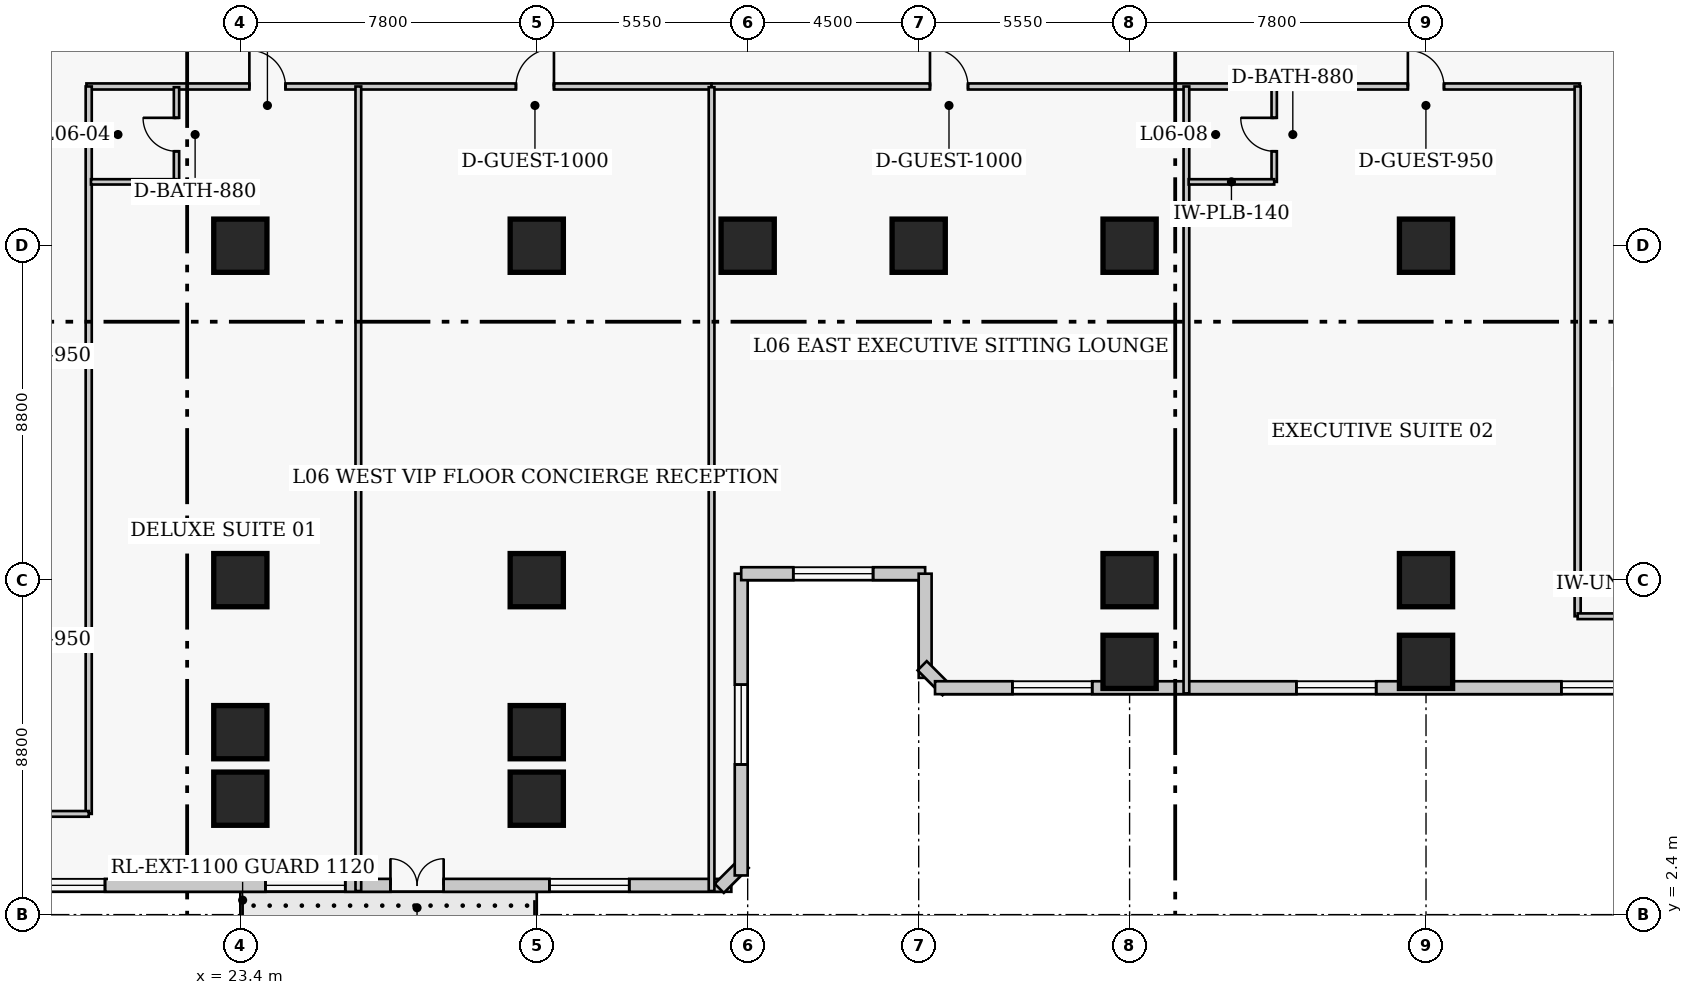
"""IFC4 building model, lengths in metres.
Left out: names, types, materials, properties, quantities, classifications, styles, units other than length and angle.
Written with IfcOpenShell. Run it as: python <this file> out.ifc"""

import sys

from ifc_helpers import new_model, si_unit, direction, frame, frame_2d, origin, origin_2d, place, context, subcontext, project, spatial, rectangle, extrude, element, fill, save


model = new_model("IFC4")
c1 = context("Model", 3, precision=1e-05, world=origin(), true_north=direction((0.0, 1.0)))
c2 = subcontext(c1, "Body", "Model", "MODEL_VIEW")
j1 = project(units=[si_unit("LENGTHUNIT", "METRE"), si_unit("PLANEANGLEUNIT", "RADIAN")], contexts=[c1])
p1 = place(None, origin())
s1 = spatial("IfcSite", under=j1, at=p1, CompositionType="ELEMENT")
p2 = place(p1, origin())
s2 = spatial("IfcBuilding", under=s1, at=p2, CompositionType="ELEMENT")
p3 = place(p2, frame((0.0, 0.0, 29.8)))
s3 = spatial("IfcBuildingStorey", under=s2, at=p3, CompositionType="ELEMENT", Elevation=29.8)
for number, where, z_axis, x_axis in (
    (1, (23.4, 11.2, 0.0), (0.0, 0.0, 1.0), (1.0, 0.0, 0.0)),
    (2, (23.4, 20.0, 0.0), (0.0, 0.0, 1.0), (1.0, 0.0, 0.0)),
    (3, (31.2, 11.2, 0.0), (0.0, 0.0, 1.0), (1.0, 0.0, 0.0)),
    (4, (31.2, 20.0, 0.0), (0.0, 0.0, 1.0), (1.0, 0.0, 0.0)),
    (5, (36.75, 20.0, 0.0), (0.0, 0.0, 1.0), (1.0, 0.0, 0.0)),
    (6, (41.25, 20.0, 0.0), (0.0, 0.0, 1.0), (1.0, 0.0, 0.0)),
    (7, (46.8, 11.2, 0.0), (0.0, 0.0, 1.0), (1.0, 0.0, 0.0)),
    (8, (46.8, 20.0, 0.0), (0.0, 0.0, 1.0), (1.0, 0.0, 0.0)),
    (9, (54.6, 11.2, 0.0), (0.0, 0.0, 1.0), (1.0, 0.0, 0.0)),
    (10, (54.6, 20.0, 0.0), (0.0, 0.0, 1.0), (1.0, 0.0, 0.0)),
    (11, (23.4, 7.2, 0.0), (0.0, 0.0, 1.0), (1.0, 0.0, 0.0)),
    (12, (31.2, 7.2, 0.0), (0.0, 0.0, 1.0), (1.0, 0.0, 0.0)),
    (13, (23.4, 5.45, 0.0), (0.0, 0.0, 1.0), (1.0, 0.0, 0.0)),
    (14, (31.2, 5.45, 0.0), (0.0, 0.0, 1.0), (1.0, 0.0, 0.0)),
    (15, (46.8, 9.05, 0.0), (0.0, 0.0, 1.0), (1.0, 0.0, 0.0)),
    (16, (54.6, 9.05, 0.0), (0.0, 0.0, 1.0), (1.0, 0.0, 0.0)),
):
    element("IfcColumn", number, at=place(p3, frame(where, z_axis=z_axis, x_axis=x_axis)), inside=s3, PredefinedType="COLUMN", context=c2, shape_type="SweptSolid", body=[
        extrude(rectangle(XDim=1.4, YDim=1.4, at=origin_2d()), origin(), (0.0, 0.0, 1.0), 3.8),
    ])
p4 = place(p3, frame((6.43, 3.17, 0.0), z_axis=(0.0, 0.0, 1.0), x_axis=(1.0, 0.0, 0.0)))
e17 = element("IfcWall", 17, at=p4, inside=s3, PredefinedType="SOLIDWALL", context=c2, shape_type="SweptSolid", body=[
    extrude(rectangle(XDim=29.89, YDim=0.34, at=frame_2d((14.945, 0.0))), origin(), (0.0, 0.0, 1.0), 3.54),
])
p5 = place(p4, frame((20.92, 0.0, 0.0)))
e18 = element("IfcOpeningElement", 18, at=p5, cuts=e17, PredefinedType="OPENING", context=c2, shape_type="SweptSolid", body=[
    extrude(rectangle(XDim=1.4, YDim=2.15, at=frame_2d((0.7, 1.075))), frame((0.0, 0.18, 0.0), z_axis=(0.0, -1.0, 0.0), x_axis=(1.0, 0.0, 0.0)), (0.0, 0.0, 1.0), 0.36),
])
p6 = place(p4, frame((2.686, 0.0, 0.85)))
e19 = element("IfcOpeningElement", 19, at=p6, cuts=e17, PredefinedType="OPENING", context=c2, shape_type="SweptSolid", body=[
    extrude(rectangle(XDim=2.1, YDim=1.85, at=frame_2d((1.05, 0.925))), frame((0.0, 0.18, 0.0), z_axis=(0.0, -1.0, 0.0), x_axis=(1.0, 0.0, 0.0)), (0.0, 0.0, 1.0), 0.36),
])
p7 = place(p4, frame((11.309, 0.0, 0.85)))
e20 = element("IfcOpeningElement", 20, at=p7, cuts=e17, PredefinedType="OPENING", context=c2, shape_type="SweptSolid", body=[
    extrude(rectangle(XDim=2.1, YDim=1.85, at=frame_2d((1.05, 0.925))), frame((0.0, 0.18, 0.0), z_axis=(0.0, -1.0, 0.0), x_axis=(1.0, 0.0, 0.0)), (0.0, 0.0, 1.0), 0.36),
])
p8 = place(p4, frame((17.631, 0.0, 0.85)))
e21 = element("IfcOpeningElement", 21, at=p8, cuts=e17, PredefinedType="OPENING", context=c2, shape_type="SweptSolid", body=[
    extrude(rectangle(XDim=2.1, YDim=1.85, at=frame_2d((1.05, 0.925))), frame((0.0, 0.18, 0.0), z_axis=(0.0, -1.0, 0.0), x_axis=(1.0, 0.0, 0.0)), (0.0, 0.0, 1.0), 0.36),
])
p9 = place(p4, frame((25.104, 0.0, 0.85)))
e22 = element("IfcOpeningElement", 22, at=p9, cuts=e17, PredefinedType="OPENING", context=c2, shape_type="SweptSolid", body=[
    extrude(rectangle(XDim=2.1, YDim=1.85, at=frame_2d((1.05, 0.925))), frame((0.0, 0.18, 0.0), z_axis=(0.0, -1.0, 0.0), x_axis=(1.0, 0.0, 0.0)), (0.0, 0.0, 1.0), 0.36),
])
p10 = place(p3, frame((36.001, 3.092, 0.0), z_axis=(0.0, 0.0, 1.0), x_axis=(0.707106781187, 0.707106781187, 0.0)))
e23 = element("IfcWall", 23, at=p10, inside=s3, PredefinedType="SOLIDWALL", context=c2, shape_type="SweptSolid", body=[
    extrude(rectangle(XDim=0.929, YDim=0.34, at=frame_2d((0.464, 0.0))), origin(), (0.0, 0.0, 1.0), 3.54),
])
p11 = place(p3, frame((36.58, 3.43, 0.0), z_axis=(0.0, 0.0, 1.0), x_axis=(0.0, 1.0, 0.0)))
e24 = element("IfcWall", 24, at=p11, inside=s3, PredefinedType="SOLIDWALL", context=c2, shape_type="SweptSolid", body=[
    extrude(rectangle(XDim=7.94, YDim=0.34, at=frame_2d((3.97, 0.0))), origin(), (0.0, 0.0, 1.0), 3.54),
])
p12 = place(p11, frame((2.92, 0.0, 0.85)))
e25 = element("IfcOpeningElement", 25, at=p12, cuts=e24, PredefinedType="OPENING", context=c2, shape_type="SweptSolid", body=[
    extrude(rectangle(XDim=2.1, YDim=1.85, at=frame_2d((1.05, 0.925))), frame((0.0, 0.18, 0.0), z_axis=(0.0, -1.0, 0.0), x_axis=(1.0, 0.0, 0.0)), (0.0, 0.0, 1.0), 0.36),
])
p13 = place(p3, frame((36.58, 11.37, 0.0), z_axis=(0.0, 0.0, 1.0), x_axis=(1.0, 0.0, 0.0)))
e26 = element("IfcWall", 26, at=p13, inside=s3, PredefinedType="SOLIDWALL", context=c2, shape_type="SweptSolid", body=[
    extrude(rectangle(XDim=4.84, YDim=0.34, at=frame_2d((2.42, 0.0))), origin(), (0.0, 0.0, 1.0), 3.54),
])
p14 = place(p13, frame((1.37, 0.0, 0.85)))
e27 = element("IfcOpeningElement", 27, at=p14, cuts=e26, PredefinedType="OPENING", context=c2, shape_type="SweptSolid", body=[
    extrude(rectangle(XDim=2.1, YDim=1.85, at=frame_2d((1.05, 0.925))), frame((0.0, 0.18, 0.0), z_axis=(0.0, -1.0, 0.0), x_axis=(1.0, 0.0, 0.0)), (0.0, 0.0, 1.0), 0.36),
])
p15 = place(p3, frame((41.42, 11.37, 0.0), z_axis=(0.0, 0.0, 1.0), x_axis=(0.0, -1.0, 0.0)))
e28 = element("IfcWall", 28, at=p15, inside=s3, PredefinedType="SOLIDWALL", context=c2, shape_type="SweptSolid", body=[
    extrude(rectangle(XDim=2.74, YDim=0.34, at=frame_2d((1.37, 0.0))), origin(), (0.0, 0.0, 1.0), 3.54),
])
p16 = place(p3, frame((41.342, 8.948, 0.0), z_axis=(0.0, 0.0, 1.0), x_axis=(0.707238225886, -0.706975312048, 0.0)))
e29 = element("IfcWall", 29, at=p16, inside=s3, PredefinedType="SOLIDWALL", context=c2, shape_type="SweptSolid", body=[
    extrude(rectangle(XDim=0.929, YDim=0.34, at=frame_2d((0.464, 0.0))), origin(), (0.0, 0.0, 1.0), 3.54),
])
p17 = place(p3, frame((41.68, 8.37, 0.0), z_axis=(0.0, 0.0, 1.0), x_axis=(1.0, 0.0, 0.0)))
e30 = element("IfcWall", 30, at=p17, inside=s3, PredefinedType="SOLIDWALL", context=c2, shape_type="SweptSolid", body=[
    extrude(rectangle(XDim=29.89, YDim=0.34, at=frame_2d((14.945, 0.0))), origin(), (0.0, 0.0, 1.0), 3.54),
])
p18 = place(p17, frame((2.036, 0.0, 0.85)))
e31 = element("IfcOpeningElement", 31, at=p18, cuts=e30, PredefinedType="OPENING", context=c2, shape_type="SweptSolid", body=[
    extrude(rectangle(XDim=2.1, YDim=1.85, at=frame_2d((1.05, 0.925))), frame((0.0, 0.18, 0.0), z_axis=(0.0, -1.0, 0.0), x_axis=(1.0, 0.0, 0.0)), (0.0, 0.0, 1.0), 0.36),
])
p19 = place(p17, frame((9.509, 0.0, 0.85)))
e32 = element("IfcOpeningElement", 32, at=p19, cuts=e30, PredefinedType="OPENING", context=c2, shape_type="SweptSolid", body=[
    extrude(rectangle(XDim=2.1, YDim=1.85, at=frame_2d((1.05, 0.925))), frame((0.0, 0.18, 0.0), z_axis=(0.0, -1.0, 0.0), x_axis=(1.0, 0.0, 0.0)), (0.0, 0.0, 1.0), 0.36),
])
p20 = place(p17, frame((16.481, 0.0, 0.85)))
e33 = element("IfcOpeningElement", 33, at=p20, cuts=e30, PredefinedType="OPENING", context=c2, shape_type="SweptSolid", body=[
    extrude(rectangle(XDim=2.1, YDim=1.85, at=frame_2d((1.05, 0.925))), frame((0.0, 0.18, 0.0), z_axis=(0.0, -1.0, 0.0), x_axis=(1.0, 0.0, 0.0)), (0.0, 0.0, 1.0), 0.36),
])
p21 = place(p17, frame((26.254, 0.0, 0.85)))
e34 = element("IfcOpeningElement", 34, at=p21, cuts=e30, PredefinedType="OPENING", context=c2, shape_type="SweptSolid", body=[
    extrude(rectangle(XDim=2.1, YDim=1.85, at=frame_2d((1.05, 0.925))), frame((0.0, 0.18, 0.0), z_axis=(0.0, -1.0, 0.0), x_axis=(1.0, 0.0, 0.0)), (0.0, 0.0, 1.0), 0.36),
])
p22 = place(p3, frame((19.35, 24.19, 0.0), z_axis=(0.0, 0.0, 1.0), x_axis=(1.0, 0.0, 0.0)))
e35 = element("IfcWall", 35, at=p22, inside=s3, PredefinedType="PARTITIONING", context=c2, shape_type="SweptSolid", body=[
    extrude(rectangle(XDim=16.45, YDim=0.16, at=frame_2d((8.225, 0.0))), origin(), (0.0, 0.0, 1.0), 3.54),
])
p23 = place(p22, frame((4.288, 0.0, 0.0)))
e36 = element("IfcOpeningElement", 36, at=p23, cuts=e35, PredefinedType="OPENING", context=c2, shape_type="SweptSolid", body=[
    extrude(rectangle(XDim=0.95, YDim=2.1, at=frame_2d((0.475, 1.05))), frame((0.0, 0.09, 0.0), z_axis=(0.0, -1.0, 0.0), x_axis=(1.0, 0.0, 0.0)), (0.0, 0.0, 1.0), 0.18),
])
p24 = place(p22, frame((11.302, 0.0, 0.0)))
e37 = element("IfcOpeningElement", 37, at=p24, cuts=e35, PredefinedType="OPENING", context=c2, shape_type="SweptSolid", body=[
    extrude(rectangle(XDim=1.0, YDim=2.15, at=frame_2d((0.5, 1.075))), frame((0.0, 0.09, 0.0), z_axis=(0.0, -1.0, 0.0), x_axis=(1.0, 0.0, 0.0)), (0.0, 0.0, 1.0), 0.18),
])
p25 = place(p3, frame((35.8, 24.19, 0.0), z_axis=(0.0, 0.0, 1.0), x_axis=(1.0, 0.0, 0.0)))
e38 = element("IfcWall", 38, at=p25, inside=s3, PredefinedType="PARTITIONING", context=c2, shape_type="SweptSolid", body=[
    extrude(rectangle(XDim=22.85, YDim=0.16, at=frame_2d((11.425, 0.0))), origin(), (0.0, 0.0, 1.0), 3.54),
])
p26 = place(p25, frame((5.748, 0.0, 0.0)))
e39 = element("IfcOpeningElement", 39, at=p26, cuts=e38, PredefinedType="OPENING", context=c2, shape_type="SweptSolid", body=[
    extrude(rectangle(XDim=1.0, YDim=2.15, at=frame_2d((0.5, 1.075))), frame((0.0, 0.09, 0.0), z_axis=(0.0, -1.0, 0.0), x_axis=(1.0, 0.0, 0.0)), (0.0, 0.0, 1.0), 0.18),
])
p27 = place(p25, frame((18.323, 0.0, 0.0)))
e40 = element("IfcOpeningElement", 40, at=p27, cuts=e38, PredefinedType="OPENING", context=c2, shape_type="SweptSolid", body=[
    extrude(rectangle(XDim=0.95, YDim=2.1, at=frame_2d((0.475, 1.05))), frame((0.0, 0.09, 0.0), z_axis=(0.0, -1.0, 0.0), x_axis=(1.0, 0.0, 0.0)), (0.0, 0.0, 1.0), 0.18),
])
p28 = place(p3, frame((19.41, 5.05, 0.0), z_axis=(0.0, 0.0, 1.0), x_axis=(0.0, 1.0, 0.0)))
e41 = element("IfcWall", 41, at=p28, inside=s3, PredefinedType="PARTITIONING", context=c2, shape_type="SweptSolid", body=[
    extrude(rectangle(XDim=19.14, YDim=0.16, at=frame_2d((9.57, 0.0))), origin(), (0.0, 0.0, 1.0), 3.004),
])
p29 = place(p3, frame((58.59, 10.25, 0.0), z_axis=(0.0, 0.0, 1.0), x_axis=(0.0, 1.0, 0.0)))
e42 = element("IfcWall", 42, at=p29, inside=s3, PredefinedType="PARTITIONING", context=c2, shape_type="SweptSolid", body=[
    extrude(rectangle(XDim=13.94, YDim=0.16, at=frame_2d((6.97, 0.0))), origin(), (0.0, 0.0, 1.0), 3.004),
])
for number, where, z_axis, x_axis in (
    (43, (58.59, 10.25, 0.0), (0.0, 0.0, 1.0), (1.0, 0.0, 0.0)),
    (44, (17.19, 5.05, 0.0), (0.0, 0.0, 1.0), (1.0, 0.0, 0.0)),
):
    element("IfcWall", number, at=place(p3, frame(where, z_axis=z_axis, x_axis=x_axis)), inside=s3, PredefinedType="PARTITIONING", context=c2, shape_type="SweptSolid", body=[
        extrude(rectangle(XDim=2.22, YDim=0.15, at=frame_2d((1.11, 0.0))), origin(), (0.0, 0.0, 1.0), 3.54),
    ])
p30 = place(p3, frame((21.72, 21.68, 0.0), z_axis=(0.0, 0.0, 1.0), x_axis=(0.0, 1.0, 0.0)))
e45 = element("IfcWall", 45, at=p30, inside=s3, PredefinedType="PLUMBINGWALL", context=c2, shape_type="SweptSolid", body=[
    extrude(rectangle(XDim=2.49, YDim=0.14, at=frame_2d((1.245, 0.0))), origin(), (0.0, 0.0, 1.0), 3.54),
])
p31 = place(p30, frame((0.805, 0.0, 0.0)))
e46 = element("IfcOpeningElement", 46, at=p31, cuts=e45, PredefinedType="OPENING", context=c2, shape_type="SweptSolid", body=[
    extrude(rectangle(XDim=0.88, YDim=2.05, at=frame_2d((0.44, 1.025))), frame((0.0, 0.08, 0.0), z_axis=(0.0, -1.0, 0.0), x_axis=(1.0, 0.0, 0.0)), (0.0, 0.0, 1.0), 0.16),
])
p32 = place(p3, frame((19.47, 21.68, 0.0), z_axis=(0.0, 0.0, 1.0), x_axis=(1.0, 0.0, 0.0)))
e47 = element("IfcWall", 47, at=p32, inside=s3, PredefinedType="PLUMBINGWALL", context=c2, shape_type="SweptSolid", body=[
    extrude(rectangle(XDim=2.25, YDim=0.14, at=frame_2d((1.125, 0.0))), origin(), (0.0, 0.0, 1.0), 3.54),
])
p33 = place(p3, frame((26.505, 3.02, 0.0), z_axis=(0.0, 0.0, 1.0), x_axis=(0.0, 1.0, 0.0)))
e48 = element("IfcWall", 48, at=p33, inside=s3, PredefinedType="PARTITIONING", context=c2, shape_type="SweptSolid", body=[
    extrude(rectangle(XDim=21.17, YDim=0.15, at=frame_2d((10.585, 0.0))), origin(), (0.0, 0.0, 1.0), 3.54),
])
p34 = place(p3, frame((35.8, 3.02, 0.0), z_axis=(0.0, 0.0, 1.0), x_axis=(0.0, 1.0, 0.0)))
e49 = element("IfcWall", 49, at=p34, inside=s3, PredefinedType="PARTITIONING", context=c2, shape_type="SweptSolid", body=[
    extrude(rectangle(XDim=21.15, YDim=0.15, at=frame_2d((10.575, 0.0))), origin(), (0.0, 0.0, 1.0), 3.54),
])
p35 = place(p3, frame((48.295, 8.22, 0.0), z_axis=(0.0, 0.0, 1.0), x_axis=(0.0, 1.0, 0.0)))
e50 = element("IfcWall", 50, at=p35, inside=s3, PredefinedType="PARTITIONING", context=c2, shape_type="SweptSolid", body=[
    extrude(rectangle(XDim=15.97, YDim=0.15, at=frame_2d((7.985, 0.0))), origin(), (0.0, 0.0, 1.0), 3.54),
])
p36 = place(p3, frame((50.605, 21.68, 0.0), z_axis=(0.0, 0.0, 1.0), x_axis=(0.0, 1.0, 0.0)))
e51 = element("IfcWall", 51, at=p36, inside=s3, PredefinedType="PLUMBINGWALL", context=c2, shape_type="SweptSolid", body=[
    extrude(rectangle(XDim=2.49, YDim=0.14, at=frame_2d((1.245, 0.0))), origin(), (0.0, 0.0, 1.0), 3.54),
])
p37 = place(p36, frame((0.805, 0.0, 0.0)))
e52 = element("IfcOpeningElement", 52, at=p37, cuts=e51, PredefinedType="OPENING", context=c2, shape_type="SweptSolid", body=[
    extrude(rectangle(XDim=0.88, YDim=2.05, at=frame_2d((0.44, 1.025))), frame((0.0, 0.08, 0.0), z_axis=(0.0, -1.0, 0.0), x_axis=(1.0, 0.0, 0.0)), (0.0, 0.0, 1.0), 0.16),
])
p38 = place(p3, frame((48.355, 21.68, 0.0), z_axis=(0.0, 0.0, 1.0), x_axis=(1.0, 0.0, 0.0)))
e53 = element("IfcWall", 53, at=p38, inside=s3, PredefinedType="PLUMBINGWALL", context=c2, shape_type="SweptSolid", body=[
    extrude(rectangle(XDim=2.25, YDim=0.14, at=frame_2d((1.125, 0.0))), origin(), (0.0, 0.0, 1.0), 3.54),
])
p39 = place(p5, origin())
e54 = element("IfcDoor", 54, at=p39, inside=s3, OperationType="DOUBLE_DOOR_SINGLE_SWING", PredefinedType="DOOR", context=c2, shape_type="SweptSolid", body=[
    extrude(rectangle(XDim=1.4, YDim=2.15, at=frame_2d((0.7, 1.075))), frame((0.0, 0.025, 0.0), z_axis=(0.0, -1.0, 0.0), x_axis=(1.0, 0.0, 0.0)), (0.0, 0.0, 1.0), 0.05),
])
fill(e18, e54)
p40 = place(p7, origin())
e55 = element("IfcWindow", 55, at=p40, inside=s3, PartitioningType="SINGLE_PANEL", PredefinedType="WINDOW", context=c2, shape_type="SweptSolid", body=[
    extrude(rectangle(XDim=2.1, YDim=1.85, at=frame_2d((1.05, 0.925))), frame((0.0, 0.03, 0.0), z_axis=(0.0, -1.0, 0.0), x_axis=(1.0, 0.0, 0.0)), (0.0, 0.0, 1.0), 0.06),
])
fill(e20, e55)
p41 = place(p8, origin())
e56 = element("IfcWindow", 56, at=p41, inside=s3, PartitioningType="SINGLE_PANEL", PredefinedType="WINDOW", context=c2, shape_type="SweptSolid", body=[
    extrude(rectangle(XDim=2.1, YDim=1.85, at=frame_2d((1.05, 0.925))), frame((0.0, 0.03, 0.0), z_axis=(0.0, -1.0, 0.0), x_axis=(1.0, 0.0, 0.0)), (0.0, 0.0, 1.0), 0.06),
])
fill(e21, e56)
p42 = place(p9, origin())
e57 = element("IfcWindow", 57, at=p42, inside=s3, PartitioningType="SINGLE_PANEL", PredefinedType="WINDOW", context=c2, shape_type="SweptSolid", body=[
    extrude(rectangle(XDim=2.1, YDim=1.85, at=frame_2d((1.05, 0.925))), frame((0.0, 0.03, 0.0), z_axis=(0.0, -1.0, 0.0), x_axis=(1.0, 0.0, 0.0)), (0.0, 0.0, 1.0), 0.06),
])
fill(e22, e57)
p43 = place(p12, origin())
e58 = element("IfcWindow", 58, at=p43, inside=s3, PartitioningType="SINGLE_PANEL", PredefinedType="WINDOW", context=c2, shape_type="SweptSolid", body=[
    extrude(rectangle(XDim=2.1, YDim=1.85, at=frame_2d((1.05, 0.925))), frame((0.0, 0.03, 0.0), z_axis=(0.0, -1.0, 0.0), x_axis=(1.0, 0.0, 0.0)), (0.0, 0.0, 1.0), 0.06),
])
fill(e25, e58)
p44 = place(p14, origin())
e59 = element("IfcWindow", 59, at=p44, inside=s3, PartitioningType="SINGLE_PANEL", PredefinedType="WINDOW", context=c2, shape_type="SweptSolid", body=[
    extrude(rectangle(XDim=2.1, YDim=1.85, at=frame_2d((1.05, 0.925))), frame((0.0, 0.03, 0.0), z_axis=(0.0, -1.0, 0.0), x_axis=(1.0, 0.0, 0.0)), (0.0, 0.0, 1.0), 0.06),
])
fill(e27, e59)
p45 = place(p18, origin())
e60 = element("IfcWindow", 60, at=p45, inside=s3, PartitioningType="SINGLE_PANEL", PredefinedType="WINDOW", context=c2, shape_type="SweptSolid", body=[
    extrude(rectangle(XDim=2.1, YDim=1.85, at=frame_2d((1.05, 0.925))), frame((0.0, 0.03, 0.0), z_axis=(0.0, -1.0, 0.0), x_axis=(1.0, 0.0, 0.0)), (0.0, 0.0, 1.0), 0.06),
])
fill(e31, e60)
p46 = place(p19, origin())
e61 = element("IfcWindow", 61, at=p46, inside=s3, PartitioningType="SINGLE_PANEL", PredefinedType="WINDOW", context=c2, shape_type="SweptSolid", body=[
    extrude(rectangle(XDim=2.1, YDim=1.85, at=frame_2d((1.05, 0.925))), frame((0.0, 0.03, 0.0), z_axis=(0.0, -1.0, 0.0), x_axis=(1.0, 0.0, 0.0)), (0.0, 0.0, 1.0), 0.06),
])
fill(e32, e61)
p47 = place(p20, origin())
e62 = element("IfcWindow", 62, at=p47, inside=s3, PartitioningType="SINGLE_PANEL", PredefinedType="WINDOW", context=c2, shape_type="SweptSolid", body=[
    extrude(rectangle(XDim=2.1, YDim=1.85, at=frame_2d((1.05, 0.925))), frame((0.0, 0.03, 0.0), z_axis=(0.0, -1.0, 0.0), x_axis=(1.0, 0.0, 0.0)), (0.0, 0.0, 1.0), 0.06),
])
fill(e33, e62)
p48 = place(p31, origin())
e63 = element("IfcDoor", 63, at=p48, inside=s3, OperationType="SINGLE_SWING_RIGHT", PredefinedType="DOOR", context=c2, shape_type="SweptSolid", body=[
    extrude(rectangle(XDim=0.88, YDim=2.05, at=frame_2d((0.44, 1.025))), frame((0.0, 0.025, 0.0), z_axis=(0.0, -1.0, 0.0), x_axis=(1.0, 0.0, 0.0)), (0.0, 0.0, 1.0), 0.05),
])
fill(e46, e63)
p49 = place(p23, origin())
e64 = element("IfcDoor", 64, at=p49, inside=s3, OperationType="SINGLE_SWING_LEFT", PredefinedType="DOOR", context=c2, shape_type="SweptSolid", body=[
    extrude(rectangle(XDim=0.95, YDim=2.1, at=frame_2d((0.475, 1.05))), frame((0.0, 0.025, 0.0), z_axis=(0.0, -1.0, 0.0), x_axis=(1.0, 0.0, 0.0)), (0.0, 0.0, 1.0), 0.05),
])
fill(e36, e64)
p50 = place(p24, origin())
e65 = element("IfcDoor", 65, at=p50, inside=s3, OperationType="SINGLE_SWING_RIGHT", PredefinedType="DOOR", context=c2, shape_type="SweptSolid", body=[
    extrude(rectangle(XDim=1.0, YDim=2.15, at=frame_2d((0.5, 1.075))), frame((0.0, 0.025, 0.0), z_axis=(0.0, -1.0, 0.0), x_axis=(1.0, 0.0, 0.0)), (0.0, 0.0, 1.0), 0.05),
])
fill(e37, e65)
p51 = place(p26, origin())
e66 = element("IfcDoor", 66, at=p51, inside=s3, OperationType="SINGLE_SWING_LEFT", PredefinedType="DOOR", context=c2, shape_type="SweptSolid", body=[
    extrude(rectangle(XDim=1.0, YDim=2.15, at=frame_2d((0.5, 1.075))), frame((0.0, 0.025, 0.0), z_axis=(0.0, -1.0, 0.0), x_axis=(1.0, 0.0, 0.0)), (0.0, 0.0, 1.0), 0.05),
])
fill(e39, e66)
p52 = place(p37, origin())
e67 = element("IfcDoor", 67, at=p52, inside=s3, OperationType="SINGLE_SWING_RIGHT", PredefinedType="DOOR", context=c2, shape_type="SweptSolid", body=[
    extrude(rectangle(XDim=0.88, YDim=2.05, at=frame_2d((0.44, 1.025))), frame((0.0, 0.025, 0.0), z_axis=(0.0, -1.0, 0.0), x_axis=(1.0, 0.0, 0.0)), (0.0, 0.0, 1.0), 0.05),
])
fill(e52, e67)
p53 = place(p27, origin())
e68 = element("IfcDoor", 68, at=p53, inside=s3, OperationType="SINGLE_SWING_LEFT", PredefinedType="DOOR", context=c2, shape_type="SweptSolid", body=[
    extrude(rectangle(XDim=0.95, YDim=2.1, at=frame_2d((0.475, 1.05))), frame((0.0, 0.025, 0.0), z_axis=(0.0, -1.0, 0.0), x_axis=(1.0, 0.0, 0.0)), (0.0, 0.0, 1.0), 0.05),
])
fill(e40, e68)
save(model, sys.argv[1])
